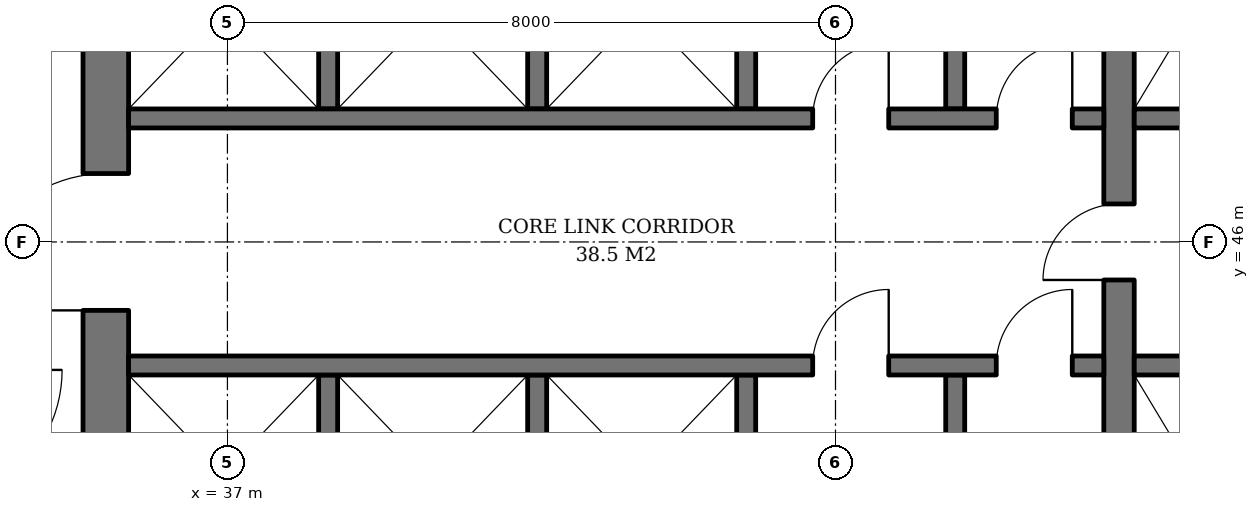
"""IFC4 building model, lengths in metres.
Left out: names, types, materials, properties, quantities, classifications, styles, units other than length and angle.
Written with IfcOpenShell. Run it as: python <this file> out.ifc"""

import sys

from ifc_helpers import new_model, si_unit, direction, frame, frame_2d, origin, place, context, subcontext, project, spatial, rectangle, extrude, element, fill, save


model = new_model("IFC4")
c1 = context("Model", 3, precision=1e-05, world=origin(), true_north=direction((0.0, 1.0)))
c2 = subcontext(c1, "Body", "Model", "MODEL_VIEW")
j1 = project(units=[si_unit("LENGTHUNIT", "METRE"), si_unit("PLANEANGLEUNIT", "RADIAN")], contexts=[c1])
p1 = place(None, origin())
s1 = spatial("IfcSite", under=j1, at=p1, CompositionType="ELEMENT")
p2 = place(p1, origin())
s2 = spatial("IfcBuilding", under=s1, at=p2, CompositionType="ELEMENT")
p3 = place(p2, frame((0.0, 0.0, 226.2)))
s3 = spatial("IfcBuildingStorey", under=s2, at=p3, CompositionType="ELEMENT", Elevation=226.2)
p4 = place(p3, frame((35.4, 36.7, 0.0), z_axis=(0.0, 0.0, 1.0), x_axis=(0.0, 1.0, 0.0)))
e1 = element("IfcWall", 1, at=p4, inside=s3, PredefinedType="SHEAR", context=c2, shape_type="SweptSolid", body=[
    extrude(rectangle(XDim=18.6, YDim=0.6, at=frame_2d((9.3, 0.0))), origin(), (0.0, 0.0, 1.0), 3.8),
])
p5 = place(p4, frame((8.4, 0.0, 0.0)))
e2 = element("IfcOpeningElement", 2, at=p5, cuts=e1, PredefinedType="OPENING", context=c2, shape_type="SweptSolid", body=[
    extrude(rectangle(XDim=1.8, YDim=2.4, at=frame_2d((0.9, 1.2))), frame((0.0, 0.31, 0.0), z_axis=(0.0, -1.0, 0.0), x_axis=(1.0, 0.0, 0.0)), (0.0, 0.0, 1.0), 0.62),
])
p6 = place(p3, frame((48.73, 40.0, 0.0), z_axis=(0.0, 0.0, 1.0), x_axis=(0.0, 1.0, 0.0)))
e3 = element("IfcWall", 3, at=p6, inside=s3, PredefinedType="SHEAR", context=c2, shape_type="SweptSolid", body=[
    extrude(rectangle(XDim=12.0, YDim=0.4, at=frame_2d((6.0, 0.0))), origin(), (0.0, 0.0, 1.0), 3.8),
])
p7 = place(p6, frame((5.5, 0.0, 0.0)))
e4 = element("IfcOpeningElement", 4, at=p7, cuts=e3, PredefinedType="OPENING", context=c2, shape_type="SweptSolid", body=[
    extrude(rectangle(XDim=1.0, YDim=2.1, at=frame_2d((0.5, 1.05))), frame((0.0, 0.21, 0.0), z_axis=(0.0, -1.0, 0.0), x_axis=(1.0, 0.0, 0.0)), (0.0, 0.0, 1.0), 0.42),
])
for number, where, z_axis, x_axis in (
    (5, (38.325, 47.75, 0.0), (0.0, 0.0, 1.0), (0.0, 1.0, 0.0)),
    (6, (41.075, 47.75, 0.0), (0.0, 0.0, 1.0), (0.0, 1.0, 0.0)),
    (7, (43.825, 47.75, 0.0), (0.0, 0.0, 1.0), (0.0, 1.0, 0.0)),
    (8, (46.575, 47.75, 0.0), (0.0, 0.0, 1.0), (0.0, 1.0, 0.0)),
):
    element("IfcWall", number, at=place(p3, frame(where, z_axis=z_axis, x_axis=x_axis)), inside=s3, PredefinedType="SHEAR", context=c2, shape_type="SweptSolid", body=[
        extrude(rectangle(XDim=2.6, YDim=0.25, at=frame_2d((1.3, 0.0))), origin(), (0.0, 0.0, 1.0), 3.8),
    ])
p8 = place(p3, frame((35.7, 47.625, 0.0), z_axis=(0.0, 0.0, 1.0), x_axis=(1.0, 0.0, 0.0)))
e9 = element("IfcWall", 9, at=p8, inside=s3, PredefinedType="SHEAR", context=c2, shape_type="SweptSolid", body=[
    extrude(rectangle(XDim=12.83, YDim=0.25, at=frame_2d((6.415, 0.0))), origin(), (0.0, 0.0, 1.0), 3.8),
])
p9 = place(p8, frame((9.0, 0.0, 0.0)))
e10 = element("IfcOpeningElement", 10, at=p9, cuts=e9, PredefinedType="OPENING", context=c2, shape_type="SweptSolid", body=[
    extrude(rectangle(XDim=1.0, YDim=2.1, at=frame_2d((0.5, 1.05))), frame((0.0, 0.135, 0.0), z_axis=(0.0, -1.0, 0.0), x_axis=(1.0, 0.0, 0.0)), (0.0, 0.0, 1.0), 0.27),
])
p10 = place(p8, frame((11.415, 0.0, 0.0)))
e11 = element("IfcOpeningElement", 11, at=p10, cuts=e9, PredefinedType="OPENING", context=c2, shape_type="SweptSolid", body=[
    extrude(rectangle(XDim=1.0, YDim=2.1, at=frame_2d((0.5, 1.05))), frame((0.0, 0.135, 0.0), z_axis=(0.0, -1.0, 0.0), x_axis=(1.0, 0.0, 0.0)), (0.0, 0.0, 1.0), 0.27),
])
for number, where, z_axis, x_axis in (
    (12, (38.325, 44.25, 0.0), (0.0, 0.0, 1.0), (0.0, -1.0, 0.0)),
    (13, (41.075, 44.25, 0.0), (0.0, 0.0, 1.0), (0.0, -1.0, 0.0)),
    (14, (43.825, 44.25, 0.0), (0.0, 0.0, 1.0), (0.0, -1.0, 0.0)),
    (15, (46.575, 44.25, 0.0), (0.0, 0.0, 1.0), (0.0, -1.0, 0.0)),
):
    element("IfcWall", number, at=place(p3, frame(where, z_axis=z_axis, x_axis=x_axis)), inside=s3, PredefinedType="SHEAR", context=c2, shape_type="SweptSolid", body=[
        extrude(rectangle(XDim=2.6, YDim=0.25, at=frame_2d((1.3, 0.0))), origin(), (0.0, 0.0, 1.0), 3.8),
    ])
p11 = place(p3, frame((35.7, 44.375, 0.0), z_axis=(0.0, 0.0, 1.0), x_axis=(1.0, 0.0, 0.0)))
e16 = element("IfcWall", 16, at=p11, inside=s3, PredefinedType="SHEAR", context=c2, shape_type="SweptSolid", body=[
    extrude(rectangle(XDim=12.83, YDim=0.25, at=frame_2d((6.415, 0.0))), origin(), (0.0, 0.0, 1.0), 3.8),
])
p12 = place(p11, frame((9.0, 0.0, 0.0)))
e17 = element("IfcOpeningElement", 17, at=p12, cuts=e16, PredefinedType="OPENING", context=c2, shape_type="SweptSolid", body=[
    extrude(rectangle(XDim=1.0, YDim=2.1, at=frame_2d((0.5, 1.05))), frame((0.0, 0.135, 0.0), z_axis=(0.0, -1.0, 0.0), x_axis=(1.0, 0.0, 0.0)), (0.0, 0.0, 1.0), 0.27),
])
p13 = place(p11, frame((11.415, 0.0, 0.0)))
e18 = element("IfcOpeningElement", 18, at=p13, cuts=e16, PredefinedType="OPENING", context=c2, shape_type="SweptSolid", body=[
    extrude(rectangle(XDim=1.0, YDim=2.1, at=frame_2d((0.5, 1.05))), frame((0.0, 0.135, 0.0), z_axis=(0.0, -1.0, 0.0), x_axis=(1.0, 0.0, 0.0)), (0.0, 0.0, 1.0), 0.27),
])
for number, where, z_axis, x_axis in (
    (19, (48.93, 47.625, 0.0), (0.0, 0.0, 1.0), (1.0, 0.0, 0.0)),
    (20, (48.93, 44.375, 0.0), (0.0, 0.0, 1.0), (1.0, 0.0, 0.0)),
):
    element("IfcWall", number, at=place(p3, frame(where, z_axis=z_axis, x_axis=x_axis)), inside=s3, PredefinedType="SHEAR", context=c2, shape_type="SweptSolid", body=[
        extrude(rectangle(XDim=5.37, YDim=0.25, at=frame_2d((2.685, 0.0))), origin(), (0.0, 0.0, 1.0), 3.8),
    ])
p14 = place(p9, origin())
e21 = element("IfcDoor", 21, at=p14, inside=s3, OperationType="SINGLE_SWING_RIGHT", PredefinedType="DOOR", context=c2, shape_type="SweptSolid", body=[
    extrude(rectangle(XDim=1.0, YDim=2.1, at=frame_2d((0.5, 1.05))), frame((0.0, 0.025, 0.0), z_axis=(0.0, -1.0, 0.0), x_axis=(1.0, 0.0, 0.0)), (0.0, 0.0, 1.0), 0.05),
])
fill(e10, e21)
p15 = place(p10, origin())
e22 = element("IfcDoor", 22, at=p15, inside=s3, OperationType="SINGLE_SWING_RIGHT", PredefinedType="DOOR", context=c2, shape_type="SweptSolid", body=[
    extrude(rectangle(XDim=1.0, YDim=2.1, at=frame_2d((0.5, 1.05))), frame((0.0, 0.025, 0.0), z_axis=(0.0, -1.0, 0.0), x_axis=(1.0, 0.0, 0.0)), (0.0, 0.0, 1.0), 0.05),
])
fill(e11, e22)
p16 = place(p12, origin())
e23 = element("IfcDoor", 23, at=p16, inside=s3, OperationType="SINGLE_SWING_RIGHT", PredefinedType="DOOR", context=c2, shape_type="SweptSolid", body=[
    extrude(rectangle(XDim=1.0, YDim=2.1, at=frame_2d((0.5, 1.05))), frame((0.0, 0.025, 0.0), z_axis=(0.0, -1.0, 0.0), x_axis=(1.0, 0.0, 0.0)), (0.0, 0.0, 1.0), 0.05),
])
fill(e17, e23)
p17 = place(p13, origin())
e24 = element("IfcDoor", 24, at=p17, inside=s3, OperationType="SINGLE_SWING_RIGHT", PredefinedType="DOOR", context=c2, shape_type="SweptSolid", body=[
    extrude(rectangle(XDim=1.0, YDim=2.1, at=frame_2d((0.5, 1.05))), frame((0.0, 0.025, 0.0), z_axis=(0.0, -1.0, 0.0), x_axis=(1.0, 0.0, 0.0)), (0.0, 0.0, 1.0), 0.05),
])
fill(e18, e24)
p18 = place(p7, origin())
e25 = element("IfcDoor", 25, at=p18, inside=s3, OperationType="SINGLE_SWING_LEFT", PredefinedType="DOOR", context=c2, shape_type="SweptSolid", body=[
    extrude(rectangle(XDim=1.0, YDim=2.1, at=frame_2d((0.5, 1.05))), frame((0.0, 0.025, 0.0), z_axis=(0.0, -1.0, 0.0), x_axis=(1.0, 0.0, 0.0)), (0.0, 0.0, 1.0), 0.05),
])
fill(e4, e25)
p19 = place(p5, origin())
e26 = element("IfcDoor", 26, at=p19, inside=s3, OperationType="DOUBLE_DOOR_SINGLE_SWING", PredefinedType="DOOR", context=c2, shape_type="SweptSolid", body=[
    extrude(rectangle(XDim=1.8, YDim=2.4, at=frame_2d((0.9, 1.2))), frame((0.0, 0.025, 0.0), z_axis=(0.0, -1.0, 0.0), x_axis=(1.0, 0.0, 0.0)), (0.0, 0.0, 1.0), 0.05),
])
fill(e2, e26)
save(model, sys.argv[1])
